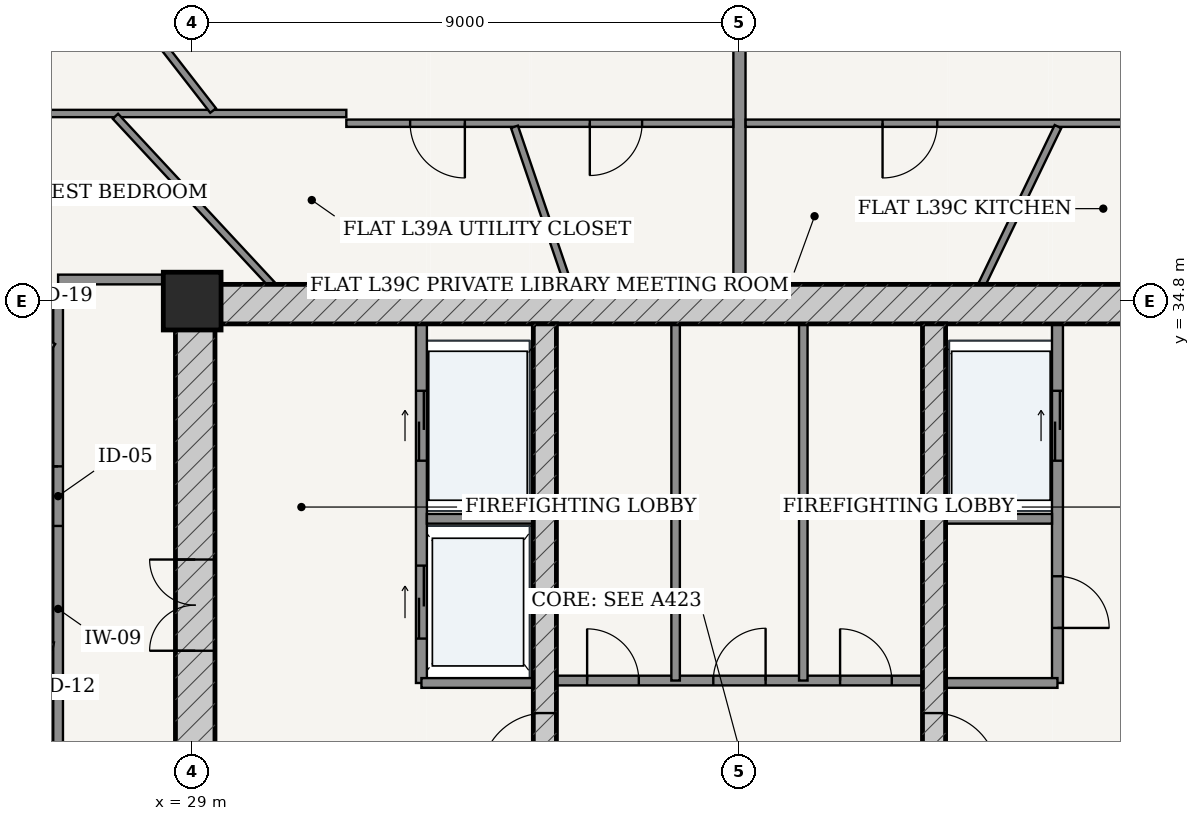
"""IFC4 building model, lengths in metres.
Left out: names, types, materials, properties, quantities, classifications, styles, units other than length and angle.
Written with IfcOpenShell. Run it as: python <this file> out.ifc"""

import sys

from ifc_helpers import new_model, si_unit, direction, frame, frame_2d, origin, origin_2d, place, context, subcontext, project, spatial, rectangle, extrude, source, transform, mapped, element, fill, save


model = new_model("IFC4")
c1 = context("Model", 3, precision=1e-05, world=origin(), true_north=direction((-0.2419218956, 0.970295726276)))
c2 = subcontext(c1, "Body", "Model", "MODEL_VIEW")
j1 = project(units=[si_unit("LENGTHUNIT", "METRE"), si_unit("PLANEANGLEUNIT", "RADIAN")], contexts=[c1])
p1 = place(None, origin())
s1 = spatial("IfcSite", under=j1, at=p1, CompositionType="ELEMENT")
p2 = place(p1, origin())
s2 = spatial("IfcBuilding", under=s1, at=p2, CompositionType="ELEMENT")
p3 = place(p2, frame((0.0, 0.0, 149.8)))
s3 = spatial("IfcBuildingStorey", under=s2, at=p3, CompositionType="ELEMENT", Elevation=149.8)
p4 = place(p3, frame((29.0, 34.8, 0.0), z_axis=(0.0, 0.0, 1.0), x_axis=(1.0, 0.0, 0.0)))
e1 = element("IfcColumn", 1, at=p4, inside=s3, PredefinedType="COLUMN", context=c2, shape_type="SweptSolid", body=[
    extrude(rectangle(XDim=0.95, YDim=0.95, at=origin_2d()), origin(), (0.0, 0.0, 1.0), 3.6),
])
p5 = place(p3, frame((28.725, 34.75, 0.0), z_axis=(0.0, 0.0, 1.0), x_axis=(1.0, 0.0, 0.0)))
e2 = element("IfcWall", 2, at=p5, inside=s3, PredefinedType="SHEAR", context=c2, shape_type="SweptSolid", body=[
    extrude(rectangle(XDim=18.55, YDim=0.65, at=frame_2d((9.275, 0.0))), origin(), (0.0, 0.0, 1.0), 3.33),
])
p6 = place(p3, frame((29.05, 19.175, 0.0), z_axis=(0.0, 0.0, 1.0), x_axis=(0.0, 1.0, 0.0)))
e3 = element("IfcWall", 3, at=p6, inside=s3, PredefinedType="SHEAR", context=c2, shape_type="SweptSolid", body=[
    extrude(rectangle(XDim=15.25, YDim=0.65, at=frame_2d((7.625, 0.0))), origin(), (0.0, 0.0, 1.0), 3.33),
])
p7 = place(p6, frame((9.875, 0.0, 0.0)))
e4 = element("IfcOpeningElement", 4, at=p7, cuts=e3, PredefinedType="OPENING", context=c2, shape_type="SweptSolid", body=[
    extrude(rectangle(XDim=1.5, YDim=2.2, at=frame_2d((0.75, 1.1))), frame((0.0, 0.335, 0.0), z_axis=(0.0, -1.0, 0.0), x_axis=(1.0, 0.0, 0.0)), (0.0, 0.0, 1.0), 0.67),
])
p8 = place(p3, frame((34.8, 19.175, 0.0), z_axis=(0.0, 0.0, 1.0), x_axis=(0.0, 1.0, 0.0)))
e5 = element("IfcWall", 5, at=p8, inside=s3, PredefinedType="SHEAR", context=c2, shape_type="SweptSolid", body=[
    extrude(rectangle(XDim=15.25, YDim=0.38, at=frame_2d((7.625, 0.0))), origin(), (0.0, 0.0, 1.0), 3.33),
])
p9 = place(p8, frame((7.8, 0.0, 0.0)))
e6 = element("IfcOpeningElement", 6, at=p9, cuts=e5, PredefinedType="OPENING", context=c2, shape_type="SweptSolid", body=[
    extrude(rectangle(XDim=1.05, YDim=2.15, at=frame_2d((0.525, 1.075))), frame((0.0, 0.2, 0.0), z_axis=(0.0, -1.0, 0.0), x_axis=(1.0, 0.0, 0.0)), (0.0, 0.0, 1.0), 0.4),
])
p10 = place(p3, frame((41.2, 19.175, 0.0), z_axis=(0.0, 0.0, 1.0), x_axis=(0.0, 1.0, 0.0)))
e7 = element("IfcWall", 7, at=p10, inside=s3, PredefinedType="SHEAR", context=c2, shape_type="SweptSolid", body=[
    extrude(rectangle(XDim=15.25, YDim=0.38, at=frame_2d((7.625, 0.0))), origin(), (0.0, 0.0, 1.0), 3.33),
])
p11 = place(p10, frame((7.8, 0.0, 0.0)))
e8 = element("IfcOpeningElement", 8, at=p11, cuts=e7, PredefinedType="OPENING", context=c2, shape_type="SweptSolid", body=[
    extrude(rectangle(XDim=1.05, YDim=2.15, at=frame_2d((0.525, 1.075))), frame((0.0, 0.2, 0.0), z_axis=(0.0, -1.0, 0.0), x_axis=(1.0, 0.0, 0.0)), (0.0, 0.0, 1.0), 0.4),
])
p12 = place(p3, frame((32.77, 28.52, 0.0), z_axis=(0.0, 0.0, 1.0), x_axis=(0.0, 1.0, 0.0)))
e9 = element("IfcWall", 9, at=p12, inside=s3, PredefinedType="PARTITIONING", context=c2, shape_type="SweptSolid", body=[
    extrude(rectangle(XDim=5.905, YDim=0.18, at=frame_2d((2.953, 0.0))), origin(), (0.0, 0.0, 1.0), 3.33),
])
p13 = place(p12, frame((3.655, 0.0, 0.0)))
e10 = element("IfcOpeningElement", 10, at=p13, cuts=e9, PredefinedType="OPENING", context=c2, shape_type="SweptSolid", body=[
    extrude(rectangle(XDim=1.15, YDim=2.2, at=frame_2d((0.575, 1.1))), frame((0.0, 0.1, 0.0), z_axis=(0.0, -1.0, 0.0), x_axis=(1.0, 0.0, 0.0)), (0.0, 0.0, 1.0), 0.2),
])
p14 = place(p12, frame((0.73, 0.0, 0.0)))
e11 = element("IfcOpeningElement", 11, at=p14, cuts=e9, PredefinedType="OPENING", context=c2, shape_type="SweptSolid", body=[
    extrude(rectangle(XDim=1.2, YDim=2.25, at=frame_2d((0.6, 1.125))), frame((0.0, 0.1, 0.0), z_axis=(0.0, -1.0, 0.0), x_axis=(1.0, 0.0, 0.0)), (0.0, 0.0, 1.0), 0.2),
])
p15 = place(p3, frame((32.86, 31.22, 0.0), z_axis=(0.0, 0.0, 1.0), x_axis=(1.0, 0.0, 0.0)))
e12 = element("IfcWall", 12, at=p15, inside=s3, PredefinedType="PARTITIONING", context=c2, shape_type="SweptSolid", body=[
    extrude(rectangle(XDim=1.75, YDim=0.16, at=frame_2d((0.875, 0.0))), origin(), (0.0, 0.0, 1.0), 3.33),
])
p16 = place(p3, frame((32.77, 28.52, 0.0), z_axis=(0.0, 0.0, 1.0), x_axis=(1.0, 0.0, 0.0)))
e13 = element("IfcWall", 13, at=p16, inside=s3, PredefinedType="PARTITIONING", context=c2, shape_type="SweptSolid", body=[
    extrude(rectangle(XDim=1.84, YDim=0.16, at=frame_2d((0.92, 0.0))), origin(), (0.0, 0.0, 1.0), 3.33),
])
p17 = place(p3, frame((43.23, 28.52, 0.0), z_axis=(0.0, 0.0, 1.0), x_axis=(0.0, 1.0, 0.0)))
e14 = element("IfcWall", 14, at=p17, inside=s3, PredefinedType="PARTITIONING", context=c2, shape_type="SweptSolid", body=[
    extrude(rectangle(XDim=5.905, YDim=0.18, at=frame_2d((2.953, 0.0))), origin(), (0.0, 0.0, 1.0), 3.33),
])
p18 = place(p17, frame((0.905, 0.0, 0.0)))
e15 = element("IfcOpeningElement", 15, at=p18, cuts=e14, PredefinedType="OPENING", context=c2, shape_type="SweptSolid", body=[
    extrude(rectangle(XDim=0.85, YDim=2.1, at=frame_2d((0.425, 1.05))), frame((0.0, 0.1, 0.0), z_axis=(0.0, -1.0, 0.0), x_axis=(1.0, 0.0, 0.0)), (0.0, 0.0, 1.0), 0.2),
])
p19 = place(p17, frame((3.655, 0.0, 0.0)))
e16 = element("IfcOpeningElement", 16, at=p19, cuts=e14, PredefinedType="OPENING", context=c2, shape_type="SweptSolid", body=[
    extrude(rectangle(XDim=1.15, YDim=2.2, at=frame_2d((0.575, 1.1))), frame((0.0, 0.1, 0.0), z_axis=(0.0, -1.0, 0.0), x_axis=(1.0, 0.0, 0.0)), (0.0, 0.0, 1.0), 0.2),
])
p20 = place(p3, frame((41.39, 31.22, 0.0), z_axis=(0.0, 0.0, 1.0), x_axis=(1.0, 0.0, 0.0)))
e17 = element("IfcWall", 17, at=p20, inside=s3, PredefinedType="PARTITIONING", context=c2, shape_type="SweptSolid", body=[
    extrude(rectangle(XDim=1.75, YDim=0.16, at=frame_2d((0.875, 0.0))), origin(), (0.0, 0.0, 1.0), 3.33),
])
p21 = place(p3, frame((41.39, 28.52, 0.0), z_axis=(0.0, 0.0, 1.0), x_axis=(1.0, 0.0, 0.0)))
e18 = element("IfcWall", 18, at=p21, inside=s3, PredefinedType="PARTITIONING", context=c2, shape_type="SweptSolid", body=[
    extrude(rectangle(XDim=1.84, YDim=0.16, at=frame_2d((0.92, 0.0))), origin(), (0.0, 0.0, 1.0), 3.33),
])
p22 = place(p3, frame((34.99, 28.56, 0.0), z_axis=(0.0, 0.0, 1.0), x_axis=(1.0, 0.0, 0.0)))
e19 = element("IfcWall", 19, at=p22, inside=s3, PredefinedType="PARTITIONING", context=c2, shape_type="SweptSolid", body=[
    extrude(rectangle(XDim=6.02, YDim=0.16, at=frame_2d((3.01, 0.0))), origin(), (0.0, 0.0, 1.0), 3.33),
])
p23 = place(p22, frame((0.505, 0.0, 0.0)))
e20 = element("IfcOpeningElement", 20, at=p23, cuts=e19, PredefinedType="OPENING", context=c2, shape_type="SweptSolid", body=[
    extrude(rectangle(XDim=0.85, YDim=2.1, at=frame_2d((0.425, 1.05))), frame((0.0, 0.09, 0.0), z_axis=(0.0, -1.0, 0.0), x_axis=(1.0, 0.0, 0.0)), (0.0, 0.0, 1.0), 0.18),
])
p24 = place(p22, frame((2.58, 0.0, 0.0)))
e21 = element("IfcOpeningElement", 21, at=p24, cuts=e19, PredefinedType="OPENING", context=c2, shape_type="SweptSolid", body=[
    extrude(rectangle(XDim=0.86, YDim=2.1, at=frame_2d((0.43, 1.05))), frame((0.0, 0.09, 0.0), z_axis=(0.0, -1.0, 0.0), x_axis=(1.0, 0.0, 0.0)), (0.0, 0.0, 1.0), 0.18),
])
p25 = place(p22, frame((4.665, 0.0, 0.0)))
e22 = element("IfcOpeningElement", 22, at=p25, cuts=e19, PredefinedType="OPENING", context=c2, shape_type="SweptSolid", body=[
    extrude(rectangle(XDim=0.85, YDim=2.1, at=frame_2d((0.425, 1.05))), frame((0.0, 0.09, 0.0), z_axis=(0.0, -1.0, 0.0), x_axis=(1.0, 0.0, 0.0)), (0.0, 0.0, 1.0), 0.18),
])
for number, where, z_axis, x_axis in (
    (23, (36.95, 28.56, 0.0), (0.0, 0.0, 1.0), (0.0, 1.0, 0.0)),
    (24, (39.05, 28.56, 0.0), (0.0, 0.0, 1.0), (0.0, 1.0, 0.0)),
):
    element("IfcWall", number, at=place(p3, frame(where, z_axis=z_axis, x_axis=x_axis)), inside=s3, PredefinedType="PARTITIONING", context=c2, shape_type="SweptSolid", body=[
        extrude(rectangle(XDim=5.865, YDim=0.14, at=frame_2d((2.933, 0.0))), origin(), (0.0, 0.0, 1.0), 3.33),
    ])
p26 = place(p3, frame((26.795, 24.4, 0.0), z_axis=(0.0, 0.0, 1.0), x_axis=(0.0, 1.0, 0.0)))
e25 = element("IfcWall", 25, at=p26, inside=s3, PredefinedType="PARTITIONING", context=c2, shape_type="SweptSolid", body=[
    extrude(rectangle(XDim=10.675, YDim=0.16, at=frame_2d((5.337, 0.0))), origin(), (0.0, 0.0, 1.0), 2.776),
])
p27 = place(p26, frame((6.702, 0.0, 0.0)))
e26 = element("IfcOpeningElement", 26, at=p27, cuts=e25, PredefinedType="OPENING", context=c2, shape_type="SweptSolid", body=[
    extrude(rectangle(XDim=0.98, YDim=2.2, at=frame_2d((0.49, 1.1))), frame((0.0, 0.09, 0.0), z_axis=(0.0, -1.0, 0.0), x_axis=(1.0, 0.0, 0.0)), (0.0, 0.0, 1.0), 0.18),
])
p28 = place(p3, frame((26.795, 35.155, 0.0), z_axis=(0.0, 0.0, 1.0), x_axis=(1.0, 0.0, 0.0)))
e27 = element("IfcWall", 27, at=p28, inside=s3, PredefinedType="PARTITIONING", context=c2, shape_type="SweptSolid", body=[
    extrude(rectangle(XDim=1.93, YDim=0.16, at=frame_2d((0.965, 0.0))), origin(), (0.0, 0.0, 1.0), 2.776),
])
p29 = place(p3, frame((38.0, 35.075, 0.0), z_axis=(0.0, 0.0, 1.0), x_axis=(0.0, 1.0, 0.0)))
e28 = element("IfcWall", 28, at=p29, inside=s3, PredefinedType="PARTITIONING", context=c2, shape_type="SweptSolid", body=[
    extrude(rectangle(XDim=12.465, YDim=0.2, at=frame_2d((6.232, 0.0))), origin(), (0.0, 0.0, 1.0), 2.415),
])
p30 = place(p3, frame((24.065, 37.885, 0.0), z_axis=(0.0, 0.0, 1.0), x_axis=(1.0, 0.0, 0.0)))
e29 = element("IfcWall", 29, at=p30, inside=s3, PredefinedType="PARTITIONING", context=c2, shape_type="SweptSolid", body=[
    extrude(rectangle(XDim=7.47, YDim=0.12, at=frame_2d((3.735, 0.0))), origin(), (0.0, 0.0, 1.0), 2.776),
])
p31 = place(p3, frame((31.535, 37.725, 0.0), z_axis=(0.0, 0.0, 1.0), x_axis=(1.0, 0.0, 0.0)))
e30 = element("IfcWall", 30, at=p31, inside=s3, PredefinedType="PARTITIONING", context=c2, shape_type="SweptSolid", body=[
    extrude(rectangle(XDim=6.363, YDim=0.12, at=frame_2d((3.182, 0.0))), origin(), (0.0, 0.0, 1.0), 2.776),
])
p32 = place(p31, frame((4.004, 0.0, 0.0)))
e31 = element("IfcOpeningElement", 31, at=p32, cuts=e30, PredefinedType="OPENING", context=c2, shape_type="SweptSolid", body=[
    extrude(rectangle(XDim=0.86, YDim=2.15, at=frame_2d((0.43, 1.075))), frame((0.0, 0.07, 0.0), z_axis=(0.0, -1.0, 0.0), x_axis=(1.0, 0.0, 0.0)), (0.0, 0.0, 1.0), 0.14),
])
p33 = place(p31, frame((1.049, 0.0, 0.0)))
e32 = element("IfcOpeningElement", 32, at=p33, cuts=e30, PredefinedType="OPENING", context=c2, shape_type="SweptSolid", body=[
    extrude(rectangle(XDim=0.9, YDim=2.15, at=frame_2d((0.45, 1.075))), frame((0.0, 0.07, 0.0), z_axis=(0.0, -1.0, 0.0), x_axis=(1.0, 0.0, 0.0)), (0.0, 0.0, 1.0), 0.14),
])
p34 = place(p3, frame((29.344, 37.934, 0.0), z_axis=(0.0, 0.0, 1.0), x_axis=(-0.613758289074, 0.789493991487, 0.0)))
e33 = element("IfcWall", 33, at=p34, inside=s3, PredefinedType="PARTITIONING", context=c2, shape_type="SweptSolid", body=[
    extrude(rectangle(XDim=7.695, YDim=0.12, at=frame_2d((3.848, 0.0))), origin(), (0.0, 0.0, 1.0), 2.776),
])
p35 = place(p34, frame((2.399, 0.0, 0.0)))
e34 = element("IfcOpeningElement", 34, at=p35, cuts=e33, PredefinedType="OPENING", context=c2, shape_type="SweptSolid", body=[
    extrude(rectangle(XDim=0.9, YDim=2.15, at=frame_2d((0.45, 1.075))), frame((0.0, 0.07, 0.0), z_axis=(0.0, -1.0, 0.0), x_axis=(1.0, 0.0, 0.0)), (0.0, 0.0, 1.0), 0.14),
])
p36 = place(p3, frame((35.182, 35.075, 0.0), z_axis=(0.0, 0.0, 1.0), x_axis=(-0.322321614946, 0.946630221649, 0.0)))
e35 = element("IfcWall", 35, at=p36, inside=s3, PredefinedType="PARTITIONING", context=c2, shape_type="SweptSolid", body=[
    extrude(rectangle(XDim=2.737, YDim=0.12, at=frame_2d((1.369, 0.0))), origin(), (0.0, 0.0, 1.0), 2.415),
])
p37 = place(p3, frame((30.307, 35.075, 0.0), z_axis=(0.0, 0.0, 1.0), x_axis=(-0.68082810609, 0.732443233267, 0.0)))
e36 = element("IfcWall", 36, at=p37, inside=s3, PredefinedType="PARTITIONING", context=c2, shape_type="SweptSolid", body=[
    extrude(rectangle(XDim=3.775, YDim=0.12, at=frame_2d((1.887, 0.0))), origin(), (0.0, 0.0, 1.0), 2.776),
])
p38 = place(p3, frame((26.715, 34.043, 0.0), z_axis=(0.0, 0.0, 1.0), x_axis=(-0.841597086151, 0.540105864235, 0.0)))
e37 = element("IfcWall", 37, at=p38, inside=s3, PredefinedType="PARTITIONING", context=c2, shape_type="SweptSolid", body=[
    extrude(rectangle(XDim=3.087, YDim=0.12, at=frame_2d((1.543, 0.0))), origin(), (0.0, 0.0, 1.0), 3.005),
])
p39 = place(p38, frame((1.113, 0.0, 0.0)))
e38 = element("IfcOpeningElement", 38, at=p39, cuts=e37, PredefinedType="OPENING", context=c2, shape_type="SweptSolid", body=[
    extrude(rectangle(XDim=0.86, YDim=2.15, at=frame_2d((0.43, 1.075))), frame((0.0, 0.07, 0.0), z_axis=(0.0, -1.0, 0.0), x_axis=(1.0, 0.0, 0.0)), (0.0, 0.0, 1.0), 0.14),
])
p40 = place(p3, frame((26.715, 29.129, 0.0), z_axis=(0.0, 0.0, 1.0), x_axis=(-0.979376501526, 0.202043728582, 0.0)))
e39 = element("IfcWall", 39, at=p40, inside=s3, PredefinedType="PARTITIONING", context=c2, shape_type="SweptSolid", body=[
    extrude(rectangle(XDim=2.644, YDim=0.12, at=frame_2d((1.322, 0.0))), origin(), (0.0, 0.0, 1.0), 3.33),
])
p41 = place(p40, frame((0.872, 0.0, 0.0)))
e40 = element("IfcOpeningElement", 40, at=p41, cuts=e39, PredefinedType="OPENING", context=c2, shape_type="SweptSolid", body=[
    extrude(rectangle(XDim=0.9, YDim=2.15, at=frame_2d((0.45, 1.075))), frame((0.0, 0.07, 0.0), z_axis=(0.0, -1.0, 0.0), x_axis=(1.0, 0.0, 0.0)), (0.0, 0.0, 1.0), 0.14),
])
p42 = place(p3, frame((38.102, 37.725, 0.0), z_axis=(0.0, 0.0, 1.0), x_axis=(1.0, 0.0, 0.0)))
e41 = element("IfcWall", 41, at=p42, inside=s3, PredefinedType="PARTITIONING", context=c2, shape_type="SweptSolid", body=[
    extrude(rectangle(XDim=6.363, YDim=0.12, at=frame_2d((3.182, 0.0))), origin(), (0.0, 0.0, 1.0), 2.776),
])
p43 = place(p42, frame((2.251, 0.0, 0.0)))
e42 = element("IfcOpeningElement", 42, at=p43, cuts=e41, PredefinedType="OPENING", context=c2, shape_type="SweptSolid", body=[
    extrude(rectangle(XDim=0.9, YDim=2.15, at=frame_2d((0.45, 1.075))), frame((0.0, 0.07, 0.0), z_axis=(0.0, -1.0, 0.0), x_axis=(1.0, 0.0, 0.0)), (0.0, 0.0, 1.0), 0.14),
])
p44 = place(p3, frame((41.988, 35.075, 0.0), z_axis=(0.0, 0.0, 1.0), x_axis=(0.434144408634, 0.900843289619, 0.0)))
e43 = element("IfcWall", 43, at=p44, inside=s3, PredefinedType="PARTITIONING", context=c2, shape_type="SweptSolid", body=[
    extrude(rectangle(XDim=2.88, YDim=0.12, at=frame_2d((1.44, 0.0))), origin(), (0.0, 0.0, 1.0), 3.33),
])
m1 = source(origin(), c2, "Body", "SweptSolid", [
    extrude(rectangle(XDim=1.5, YDim=2.2, at=frame_2d((0.75, 1.1))), frame((0.0, 0.025, 0.0), z_axis=(0.0, -1.0, 0.0), x_axis=(1.0, 0.0, 0.0)), (0.0, 0.0, 1.0), 0.05),
])
p45 = place(p7, origin())
e44 = element("IfcDoor", 44, at=p45, inside=s3, OperationType="DOUBLE_DOOR_SINGLE_SWING", PredefinedType="DOOR", context=c2, shape_type="MappedRepresentation", body=[
    mapped(m1, transform((0.0, 0.0, 0.0), scale=1.0)),
])
fill(e4, e44)
m2 = source(origin(), c2, "Body", "SweptSolid", [
    extrude(rectangle(XDim=1.05, YDim=2.15, at=frame_2d((0.525, 1.075))), frame((0.0, 0.025, 0.0), z_axis=(0.0, -1.0, 0.0), x_axis=(1.0, 0.0, 0.0)), (0.0, 0.0, 1.0), 0.05),
])
p46 = place(p9, origin())
e45 = element("IfcDoor", 45, at=p46, inside=s3, OperationType="SINGLE_SWING_LEFT", PredefinedType="DOOR", context=c2, shape_type="MappedRepresentation", body=[
    mapped(m2, transform((0.0, 0.0, 0.0), scale=1.0)),
])
fill(e6, e45)
p47 = place(p11, frame((1.05, 0.0, 0.0), z_axis=(0.0, 0.0, 1.0), x_axis=(-1.0, 0.0, 0.0)))
e46 = element("IfcDoor", 46, at=p47, inside=s3, OperationType="SINGLE_SWING_RIGHT", PredefinedType="DOOR", context=c2, shape_type="MappedRepresentation", body=[
    mapped(m2, transform((0.0, 0.0, 0.0), scale=1.0)),
])
fill(e8, e46)
m3 = source(origin(), c2, "Body", "SweptSolid", [
    extrude(rectangle(XDim=0.85, YDim=2.1, at=frame_2d((0.425, 1.05))), frame((0.0, 0.025, 0.0), z_axis=(0.0, -1.0, 0.0), x_axis=(1.0, 0.0, 0.0)), (0.0, 0.0, 1.0), 0.05),
])
p48 = place(p18, frame((0.85, 0.0, 0.0), z_axis=(0.0, 0.0, 1.0), x_axis=(-1.0, 0.0, 0.0)))
e47 = element("IfcDoor", 47, at=p48, inside=s3, OperationType="SINGLE_SWING_RIGHT", PredefinedType="DOOR", context=c2, shape_type="MappedRepresentation", body=[
    mapped(m3, transform((0.0, 0.0, 0.0), scale=1.0)),
])
fill(e15, e47)
p49 = place(p23, origin())
e48 = element("IfcDoor", 48, at=p49, inside=s3, OperationType="SINGLE_SWING_LEFT", PredefinedType="DOOR", context=c2, shape_type="MappedRepresentation", body=[
    mapped(m3, transform((0.0, 0.0, 0.0), scale=1.0)),
])
fill(e20, e48)
m4 = source(origin(), c2, "Body", "SweptSolid", [
    extrude(rectangle(XDim=0.86, YDim=2.1, at=frame_2d((0.43, 1.05))), frame((0.0, 0.025, 0.0), z_axis=(0.0, -1.0, 0.0), x_axis=(1.0, 0.0, 0.0)), (0.0, 0.0, 1.0), 0.05),
])
p50 = place(p24, origin())
e49 = element("IfcDoor", 49, at=p50, inside=s3, OperationType="SINGLE_SWING_RIGHT", PredefinedType="DOOR", context=c2, shape_type="MappedRepresentation", body=[
    mapped(m4, transform((0.0, 0.0, 0.0), scale=1.0)),
])
fill(e21, e49)
p51 = place(p25, origin())
e50 = element("IfcDoor", 50, at=p51, inside=s3, OperationType="SINGLE_SWING_LEFT", PredefinedType="DOOR", context=c2, shape_type="MappedRepresentation", body=[
    mapped(m3, transform((0.0, 0.0, 0.0), scale=1.0)),
])
fill(e22, e50)
m5 = source(origin(), c2, "Body", "SweptSolid", [
    extrude(rectangle(XDim=1.15, YDim=2.2, at=frame_2d((0.575, 1.1))), frame((0.0, 0.025, 0.0), z_axis=(0.0, -1.0, 0.0), x_axis=(1.0, 0.0, 0.0)), (0.0, 0.0, 1.0), 0.05),
])
p52 = place(p13, origin())
e51 = element("IfcDoor", 51, at=p52, inside=s3, OperationType="DOUBLE_DOOR_SLIDING", PredefinedType="DOOR", context=c2, shape_type="MappedRepresentation", body=[
    mapped(m5, transform((0.0, 0.0, 0.0), scale=1.0)),
])
fill(e10, e51)
p53 = place(p19, origin())
e52 = element("IfcDoor", 52, at=p53, inside=s3, OperationType="DOUBLE_DOOR_SLIDING", PredefinedType="DOOR", context=c2, shape_type="MappedRepresentation", body=[
    mapped(m5, transform((0.0, 0.0, 0.0), scale=1.0)),
])
fill(e16, e52)
m6 = source(origin(), c2, "Body", "SweptSolid", [
    extrude(rectangle(XDim=1.2, YDim=2.25, at=frame_2d((0.6, 1.125))), frame((0.0, 0.025, 0.0), z_axis=(0.0, -1.0, 0.0), x_axis=(1.0, 0.0, 0.0)), (0.0, 0.0, 1.0), 0.05),
])
p54 = place(p14, origin())
e53 = element("IfcDoor", 53, at=p54, inside=s3, OperationType="DOUBLE_DOOR_SLIDING", PredefinedType="DOOR", context=c2, shape_type="MappedRepresentation", body=[
    mapped(m6, transform((0.0, 0.0, 0.0), scale=1.0)),
])
fill(e11, e53)
m7 = source(origin(), c2, "Body", "SweptSolid", [
    extrude(rectangle(XDim=0.98, YDim=2.2, at=frame_2d((0.49, 1.1))), frame((0.0, 0.025, 0.0), z_axis=(0.0, -1.0, 0.0), x_axis=(1.0, 0.0, 0.0)), (0.0, 0.0, 1.0), 0.05),
])
p55 = place(p27, origin())
e54 = element("IfcDoor", 54, at=p55, inside=s3, OperationType="SINGLE_SWING_RIGHT", PredefinedType="DOOR", context=c2, shape_type="MappedRepresentation", body=[
    mapped(m7, transform((0.0, 0.0, 0.0), scale=1.0)),
])
fill(e26, e54)
m8 = source(origin(), c2, "Body", "SweptSolid", [
    extrude(rectangle(XDim=0.86, YDim=2.15, at=frame_2d((0.43, 1.075))), frame((0.0, 0.025, 0.0), z_axis=(0.0, -1.0, 0.0), x_axis=(1.0, 0.0, 0.0)), (0.0, 0.0, 1.0), 0.05),
])
p56 = place(p32, frame((0.86, 0.0, 0.0), z_axis=(0.0, 0.0, 1.0), x_axis=(-1.0, 0.0, 0.0)))
e55 = element("IfcDoor", 55, at=p56, inside=s3, OperationType="SINGLE_SWING_RIGHT", PredefinedType="DOOR", context=c2, shape_type="MappedRepresentation", body=[
    mapped(m8, transform((0.0, 0.0, 0.0), scale=1.0)),
])
fill(e31, e55)
m9 = source(origin(), c2, "Body", "SweptSolid", [
    extrude(rectangle(XDim=0.9, YDim=2.15, at=frame_2d((0.45, 1.075))), frame((0.0, 0.025, 0.0), z_axis=(0.0, -1.0, 0.0), x_axis=(1.0, 0.0, 0.0)), (0.0, 0.0, 1.0), 0.05),
])
p57 = place(p33, frame((0.9, 0.0, 0.0), z_axis=(0.0, 0.0, 1.0), x_axis=(-1.0, 0.0, 0.0)))
e56 = element("IfcDoor", 56, at=p57, inside=s3, OperationType="SINGLE_SWING_LEFT", PredefinedType="DOOR", context=c2, shape_type="MappedRepresentation", body=[
    mapped(m9, transform((0.0, 0.0, 0.0), scale=1.0)),
])
fill(e32, e56)
p58 = place(p43, frame((0.9, 0.0, 0.0), z_axis=(0.0, 0.0, 1.0), x_axis=(-1.0, 0.0, 0.0)))
e57 = element("IfcDoor", 57, at=p58, inside=s3, OperationType="SINGLE_SWING_RIGHT", PredefinedType="DOOR", context=c2, shape_type="MappedRepresentation", body=[
    mapped(m9, transform((0.0, 0.0, 0.0), scale=1.0)),
])
fill(e42, e57)
save(model, sys.argv[1])
